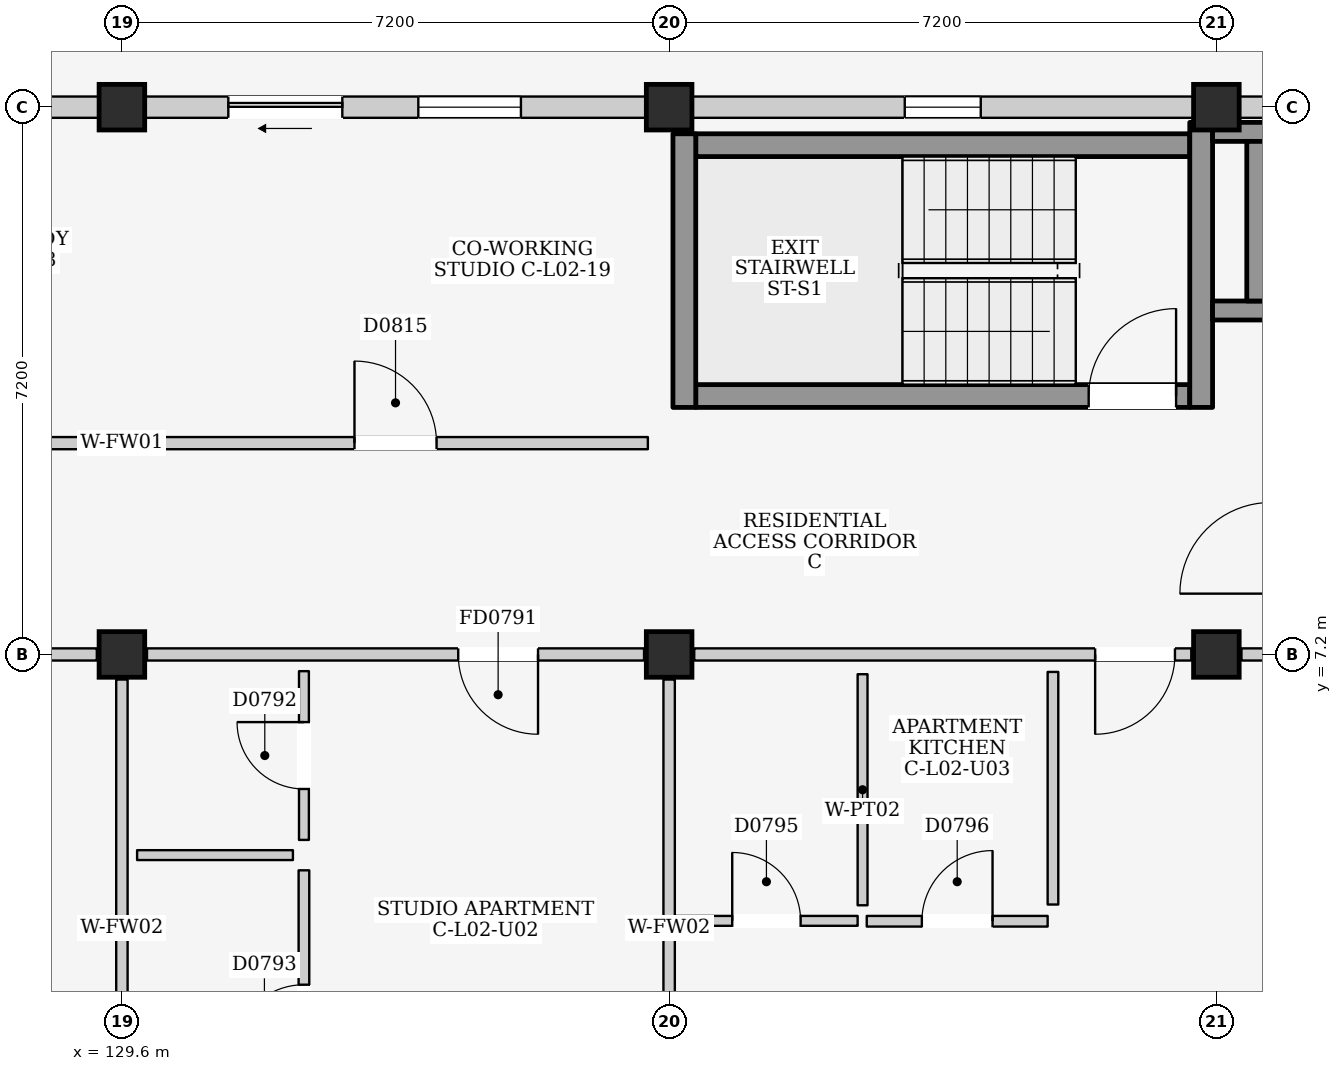
"""IFC4 building model, lengths in metres.
Left out: names, types, materials, properties, quantities, classifications, styles, units other than length and angle.
Written with IfcOpenShell. Run it as: python <this file> out.ifc"""

import sys

from ifc_helpers import new_model, si_unit, direction, frame, frame_2d, origin, origin_2d, place, context, subcontext, project, spatial, rectangle, extrude, element, fill, save


model = new_model("IFC4")
c1 = context("Model", 3, precision=1e-05, world=origin(), true_north=direction((0.0, 1.0)))
c2 = subcontext(c1, "Body", "Model", "MODEL_VIEW")
j1 = project(units=[si_unit("LENGTHUNIT", "METRE"), si_unit("PLANEANGLEUNIT", "RADIAN")], contexts=[c1])
p1 = place(None, origin())
s1 = spatial("IfcSite", under=j1, at=p1, CompositionType="ELEMENT")
p2 = place(p1, origin())
s2 = spatial("IfcBuilding", under=s1, at=p2, CompositionType="ELEMENT")
p3 = place(p2, frame((0.0, 0.0, 9.0)))
s3 = spatial("IfcBuildingStorey", under=s2, at=p3, CompositionType="ELEMENT", Elevation=9.0)
for number, where, z_axis, x_axis in (
    (1, (129.6, 7.2, 0.0), (0.0, 0.0, 1.0), (1.0, 0.0, 0.0)),
    (2, (129.6, 14.4, 0.0), (0.0, 0.0, 1.0), (1.0, 0.0, 0.0)),
    (3, (136.8, 7.2, 0.0), (0.0, 0.0, 1.0), (1.0, 0.0, 0.0)),
    (4, (136.8, 14.4, 0.0), (0.0, 0.0, 1.0), (1.0, 0.0, 0.0)),
    (5, (144.0, 7.2, 0.0), (0.0, 0.0, 1.0), (1.0, 0.0, 0.0)),
    (6, (144.0, 14.4, 0.0), (0.0, 0.0, 1.0), (1.0, 0.0, 0.0)),
):
    element("IfcColumn", number, at=place(p3, frame(where, z_axis=z_axis, x_axis=x_axis)), inside=s3, PredefinedType="COLUMN", context=c2, shape_type="SweptSolid", body=[
        extrude(rectangle(XDim=0.6, YDim=0.6, at=origin_2d()), origin(), (0.0, 0.0, 1.0), 3.2),
    ])
p4 = place(p3, frame((122.7, 14.4, 0.0), z_axis=(0.0, 0.0, 1.0), x_axis=(1.0, 0.0, 0.0)))
e7 = element("IfcWall", 7, at=p4, inside=s3, PredefinedType="ELEMENTEDWALL", context=c2, shape_type="SweptSolid", body=[
    extrude(rectangle(XDim=6.6, YDim=0.28, at=frame_2d((3.3, 0.0))), origin(), (0.0, 0.0, 1.0), 2.345),
])
p5 = place(p4, frame((1.1, 0.0, 0.0)))
e8 = element("IfcOpeningElement", 8, at=p5, cuts=e7, PredefinedType="OPENING", context=c2, shape_type="SweptSolid", body=[
    extrude(rectangle(XDim=1.5, YDim=2.12, at=frame_2d((0.75, 1.06))), frame((0.0, 0.155, 0.0), z_axis=(0.0, -1.0, 0.0), x_axis=(1.0, 0.0, 0.0)), (0.0, 0.0, 1.0), 0.31),
])
p6 = place(p4, frame((3.6, 0.0, 0.735)))
e9 = element("IfcOpeningElement", 9, at=p6, cuts=e7, PredefinedType="OPENING", context=c2, shape_type="SweptSolid", body=[
    extrude(rectangle(XDim=1.35, YDim=1.5, at=frame_2d((0.675, 0.75))), frame((0.0, 0.155, 0.0), z_axis=(0.0, -1.0, 0.0), x_axis=(1.0, 0.0, 0.0)), (0.0, 0.0, 1.0), 0.31),
])
p7 = place(p3, frame((129.9, 14.4, 0.0), z_axis=(0.0, 0.0, 1.0), x_axis=(1.0, 0.0, 0.0)))
e10 = element("IfcWall", 10, at=p7, inside=s3, PredefinedType="ELEMENTEDWALL", context=c2, shape_type="SweptSolid", body=[
    extrude(rectangle(XDim=6.6, YDim=0.28, at=frame_2d((3.3, 0.0))), origin(), (0.0, 0.0, 1.0), 2.345),
])
p8 = place(p7, frame((1.1, 0.0, 0.0)))
e11 = element("IfcOpeningElement", 11, at=p8, cuts=e10, PredefinedType="OPENING", context=c2, shape_type="SweptSolid", body=[
    extrude(rectangle(XDim=1.5, YDim=2.12, at=frame_2d((0.75, 1.06))), frame((0.0, 0.155, 0.0), z_axis=(0.0, -1.0, 0.0), x_axis=(1.0, 0.0, 0.0)), (0.0, 0.0, 1.0), 0.31),
])
p9 = place(p7, frame((3.6, 0.0, 0.735)))
e12 = element("IfcOpeningElement", 12, at=p9, cuts=e10, PredefinedType="OPENING", context=c2, shape_type="SweptSolid", body=[
    extrude(rectangle(XDim=1.35, YDim=1.5, at=frame_2d((0.675, 0.75))), frame((0.0, 0.155, 0.0), z_axis=(0.0, -1.0, 0.0), x_axis=(1.0, 0.0, 0.0)), (0.0, 0.0, 1.0), 0.31),
])
p10 = place(p3, frame((137.1, 14.4, 0.0), z_axis=(0.0, 0.0, 1.0), x_axis=(1.0, 0.0, 0.0)))
e13 = element("IfcWall", 13, at=p10, inside=s3, PredefinedType="ELEMENTEDWALL", context=c2, shape_type="SweptSolid", body=[
    extrude(rectangle(XDim=6.6, YDim=0.28, at=frame_2d((3.3, 0.0))), origin(), (0.0, 0.0, 1.0), 2.345),
])
p11 = place(p10, frame((2.8, 0.0, 1.2)))
e14 = element("IfcOpeningElement", 14, at=p11, cuts=e13, PredefinedType="OPENING", context=c2, shape_type="SweptSolid", body=[
    extrude(rectangle(XDim=1.0, YDim=0.9, at=frame_2d((0.5, 0.45))), frame((0.0, 0.155, 0.0), z_axis=(0.0, -1.0, 0.0), x_axis=(1.0, 0.0, 0.0)), (0.0, 0.0, 1.0), 0.31),
])
p12 = place(p3, frame((144.3, 14.4, 0.0), z_axis=(0.0, 0.0, 1.0), x_axis=(1.0, 0.0, 0.0)))
e15 = element("IfcWall", 15, at=p12, inside=s3, PredefinedType="ELEMENTEDWALL", context=c2, shape_type="SweptSolid", body=[
    extrude(rectangle(XDim=6.6, YDim=0.28, at=frame_2d((3.3, 0.0))), origin(), (0.0, 0.0, 1.0), 2.345),
])
p13 = place(p12, frame((2.8, 0.0, 1.2)))
e16 = element("IfcOpeningElement", 16, at=p13, cuts=e15, PredefinedType="OPENING", context=c2, shape_type="SweptSolid", body=[
    extrude(rectangle(XDim=1.0, YDim=0.9, at=frame_2d((0.5, 0.45))), frame((0.0, 0.155, 0.0), z_axis=(0.0, -1.0, 0.0), x_axis=(1.0, 0.0, 0.0)), (0.0, 0.0, 1.0), 0.31),
])
p14 = place(p3, frame((137.15, 10.6, 0.0), z_axis=(0.0, 0.0, 1.0), x_axis=(1.0, 0.0, 0.0)))
e17 = element("IfcWall", 17, at=p14, inside=s3, PredefinedType="SHEAR", context=c2, shape_type="SweptSolid", body=[
    extrude(rectangle(XDim=6.5, YDim=0.3, at=frame_2d((3.25, 0.0))), origin(), (0.0, 0.0, 1.0), 2.96),
])
p15 = place(p14, frame((5.17, 0.0, 0.0)))
e18 = element("IfcOpeningElement", 18, at=p15, cuts=e17, PredefinedType="OPENING", context=c2, shape_type="SweptSolid", body=[
    extrude(rectangle(XDim=1.15, YDim=2.2, at=frame_2d((0.575, 1.1))), frame((0.0, 0.165, 0.0), z_axis=(0.0, -1.0, 0.0), x_axis=(1.0, 0.0, 0.0)), (0.0, 0.0, 1.0), 0.33),
])
p16 = place(p3, frame((137.15, 13.9, 0.0), z_axis=(0.0, 0.0, 1.0), x_axis=(1.0, 0.0, 0.0)))
e19 = element("IfcWall", 19, at=p16, inside=s3, PredefinedType="SHEAR", context=c2, shape_type="SweptSolid", body=[
    extrude(rectangle(XDim=6.5, YDim=0.3, at=frame_2d((3.25, 0.0))), origin(), (0.0, 0.0, 1.0), 2.96),
])
p17 = place(p3, frame((137.0, 10.45, 0.0), z_axis=(0.0, 0.0, 1.0), x_axis=(0.0, 1.0, 0.0)))
e20 = element("IfcWall", 20, at=p17, inside=s3, PredefinedType="SHEAR", context=c2, shape_type="SweptSolid", body=[
    extrude(rectangle(XDim=3.6, YDim=0.3, at=frame_2d((1.8, 0.0))), origin(), (0.0, 0.0, 1.0), 2.96),
])
p18 = place(p3, frame((143.8, 10.45, 0.0), z_axis=(0.0, 0.0, 1.0), x_axis=(0.0, 1.0, 0.0)))
e21 = element("IfcWall", 21, at=p18, inside=s3, PredefinedType="SHEAR", context=c2, shape_type="SweptSolid", body=[
    extrude(rectangle(XDim=3.75, YDim=0.3, at=frame_2d((1.875, 0.0))), origin(), (0.0, 0.0, 1.0), 2.96),
])
p19 = place(p3, frame((143.95, 11.725, 0.0), z_axis=(0.0, 0.0, 1.0), x_axis=(1.0, 0.0, 0.0)))
e22 = element("IfcWall", 22, at=p19, inside=s3, PredefinedType="SHEAR", context=c2, shape_type="SweptSolid", body=[
    extrude(rectangle(XDim=2.55, YDim=0.25, at=frame_2d((1.275, 0.0))), origin(), (0.0, 0.0, 1.0), 2.96),
])
p20 = place(p19, frame((0.95, 0.0, 0.0)))
e23 = element("IfcOpeningElement", 23, at=p20, cuts=e22, PredefinedType="OPENING", context=c2, shape_type="SweptSolid", body=[
    extrude(rectangle(XDim=1.1, YDim=2.15, at=frame_2d((0.55, 1.075))), frame((0.0, 0.14, 0.0), z_axis=(0.0, -1.0, 0.0), x_axis=(1.0, 0.0, 0.0)), (0.0, 0.0, 1.0), 0.28),
])
p21 = place(p3, frame((143.95, 14.075, 0.0), z_axis=(0.0, 0.0, 1.0), x_axis=(1.0, 0.0, 0.0)))
e24 = element("IfcWall", 24, at=p21, inside=s3, PredefinedType="SHEAR", context=c2, shape_type="SweptSolid", body=[
    extrude(rectangle(XDim=2.55, YDim=0.25, at=frame_2d((1.275, 0.0))), origin(), (0.0, 0.0, 1.0), 2.96),
])
p22 = place(p3, frame((144.525, 11.85, 0.0), z_axis=(0.0, 0.0, 1.0), x_axis=(0.0, 1.0, 0.0)))
e25 = element("IfcWall", 25, at=p22, inside=s3, PredefinedType="SHEAR", context=c2, shape_type="SweptSolid", body=[
    extrude(rectangle(XDim=2.1, YDim=0.25, at=frame_2d((1.05, 0.0))), origin(), (0.0, 0.0, 1.0), 2.96),
])
p23 = place(p3, frame((122.73, 7.2, 0.0), z_axis=(0.0, 0.0, 1.0), x_axis=(1.0, 0.0, 0.0)))
e26 = element("IfcWall", 26, at=p23, inside=s3, PredefinedType="PARTITIONING", context=c2, shape_type="SweptSolid", body=[
    extrude(rectangle(XDim=6.54, YDim=0.16, at=frame_2d((3.27, 0.0))), origin(), (0.0, 0.0, 1.0), 2.345),
])
p24 = place(p23, frame((4.795, 0.0, 0.0)))
e27 = element("IfcOpeningElement", 27, at=p24, cuts=e26, PredefinedType="OPENING", context=c2, shape_type="SweptSolid", body=[
    extrude(rectangle(XDim=1.05, YDim=2.15, at=frame_2d((0.525, 1.075))), frame((0.0, 0.095, 0.0), z_axis=(0.0, -1.0, 0.0), x_axis=(1.0, 0.0, 0.0)), (0.0, 0.0, 1.0), 0.19),
])
p25 = place(p3, frame((129.6, 0.33, 0.0), z_axis=(0.0, 0.0, 1.0), x_axis=(0.0, 1.0, 0.0)))
e28 = element("IfcWall", 28, at=p25, inside=s3, PredefinedType="PARTITIONING", context=c2, shape_type="SweptSolid", body=[
    extrude(rectangle(XDim=6.54, YDim=0.15, at=frame_2d((3.27, 0.0))), origin(), (0.0, 0.0, 1.0), 2.395),
])
p26 = place(p3, frame((129.93, 7.2, 0.0), z_axis=(0.0, 0.0, 1.0), x_axis=(1.0, 0.0, 0.0)))
e29 = element("IfcWall", 29, at=p26, inside=s3, PredefinedType="PARTITIONING", context=c2, shape_type="SweptSolid", body=[
    extrude(rectangle(XDim=6.54, YDim=0.16, at=frame_2d((3.27, 0.0))), origin(), (0.0, 0.0, 1.0), 2.345),
])
p27 = place(p26, frame((4.095, 0.0, 0.0)))
e30 = element("IfcOpeningElement", 30, at=p27, cuts=e29, PredefinedType="OPENING", context=c2, shape_type="SweptSolid", body=[
    extrude(rectangle(XDim=1.05, YDim=2.15, at=frame_2d((0.525, 1.075))), frame((0.0, 0.095, 0.0), z_axis=(0.0, -1.0, 0.0), x_axis=(1.0, 0.0, 0.0)), (0.0, 0.0, 1.0), 0.19),
])
p28 = place(p3, frame((136.8, 0.33, 0.0), z_axis=(0.0, 0.0, 1.0), x_axis=(0.0, 1.0, 0.0)))
e31 = element("IfcWall", 31, at=p28, inside=s3, PredefinedType="PARTITIONING", context=c2, shape_type="SweptSolid", body=[
    extrude(rectangle(XDim=6.54, YDim=0.15, at=frame_2d((3.27, 0.0))), origin(), (0.0, 0.0, 1.0), 2.395),
])
p29 = place(p3, frame((129.8, 4.56, 0.0), z_axis=(0.0, 0.0, 1.0), x_axis=(1.0, 0.0, 0.0)))
e32 = element("IfcWall", 32, at=p29, inside=s3, PredefinedType="PARTITIONING", context=c2, shape_type="SweptSolid", body=[
    extrude(rectangle(XDim=2.05, YDim=0.13, at=frame_2d((1.025, 0.0))), origin(), (0.0, 0.0, 1.0), 2.96),
])
p30 = place(p3, frame((131.995, 4.76, 0.0), z_axis=(0.0, 0.0, 1.0), x_axis=(0.0, 1.0, 0.0)))
e33 = element("IfcWall", 33, at=p30, inside=s3, PredefinedType="PARTITIONING", context=c2, shape_type="SweptSolid", body=[
    extrude(rectangle(XDim=2.22, YDim=0.13, at=frame_2d((1.11, 0.0))), origin(), (0.0, 0.0, 1.0), 2.96),
])
p31 = place(p30, frame((0.67, 0.0, 0.0)))
e34 = element("IfcOpeningElement", 34, at=p31, cuts=e33, PredefinedType="OPENING", context=c2, shape_type="SweptSolid", body=[
    extrude(rectangle(XDim=0.88, YDim=2.1, at=frame_2d((0.44, 1.05))), frame((0.0, 0.08, 0.0), z_axis=(0.0, -1.0, 0.0), x_axis=(1.0, 0.0, 0.0)), (0.0, 0.0, 1.0), 0.16),
])
p32 = place(p3, frame((131.995, 0.42, 0.0), z_axis=(0.0, 0.0, 1.0), x_axis=(0.0, 1.0, 0.0)))
e35 = element("IfcWall", 35, at=p32, inside=s3, PredefinedType="PARTITIONING", context=c2, shape_type="SweptSolid", body=[
    extrude(rectangle(XDim=3.94, YDim=0.14, at=frame_2d((1.97, 0.0))), origin(), (0.0, 0.0, 1.0), 2.96),
])
p33 = place(p32, frame((1.505, 0.0, 0.0)))
e36 = element("IfcOpeningElement", 36, at=p33, cuts=e35, PredefinedType="OPENING", context=c2, shape_type="SweptSolid", body=[
    extrude(rectangle(XDim=0.93, YDim=2.14, at=frame_2d((0.465, 1.07))), frame((0.0, 0.085, 0.0), z_axis=(0.0, -1.0, 0.0), x_axis=(1.0, 0.0, 0.0)), (0.0, 0.0, 1.0), 0.17),
])
p34 = place(p3, frame((137.13, 7.2, 0.0), z_axis=(0.0, 0.0, 1.0), x_axis=(1.0, 0.0, 0.0)))
e37 = element("IfcWall", 37, at=p34, inside=s3, PredefinedType="PARTITIONING", context=c2, shape_type="SweptSolid", body=[
    extrude(rectangle(XDim=6.54, YDim=0.16, at=frame_2d((3.27, 0.0))), origin(), (0.0, 0.0, 1.0), 2.345),
])
p35 = place(p34, frame((5.275, 0.0, 0.0)))
e38 = element("IfcOpeningElement", 38, at=p35, cuts=e37, PredefinedType="OPENING", context=c2, shape_type="SweptSolid", body=[
    extrude(rectangle(XDim=1.05, YDim=2.15, at=frame_2d((0.525, 1.075))), frame((0.0, 0.095, 0.0), z_axis=(0.0, -1.0, 0.0), x_axis=(1.0, 0.0, 0.0)), (0.0, 0.0, 1.0), 0.19),
])
p36 = place(p3, frame((144.33, 7.2, 0.0), z_axis=(0.0, 0.0, 1.0), x_axis=(1.0, 0.0, 0.0)))
e39 = element("IfcWall", 39, at=p36, inside=s3, PredefinedType="PARTITIONING", context=c2, shape_type="SweptSolid", body=[
    extrude(rectangle(XDim=6.54, YDim=0.16, at=frame_2d((3.27, 0.0))), origin(), (0.0, 0.0, 1.0), 2.345),
])
p37 = place(p3, frame((136.88, 3.695, 0.0), z_axis=(0.0, 0.0, 1.0), x_axis=(1.0, 0.0, 0.0)))
e40 = element("IfcWall", 40, at=p37, inside=s3, PredefinedType="PARTITIONING", context=c2, shape_type="SweptSolid", body=[
    extrude(rectangle(XDim=2.4, YDim=0.13, at=frame_2d((1.2, 0.0))), origin(), (0.0, 0.0, 1.0), 2.96),
])
p38 = place(p37, frame((0.75, 0.0, 0.0)))
e41 = element("IfcOpeningElement", 41, at=p38, cuts=e40, PredefinedType="OPENING", context=c2, shape_type="SweptSolid", body=[
    extrude(rectangle(XDim=0.9, YDim=2.1, at=frame_2d((0.45, 1.05))), frame((0.0, 0.08, 0.0), z_axis=(0.0, -1.0, 0.0), x_axis=(1.0, 0.0, 0.0)), (0.0, 0.0, 1.0), 0.16),
])
p39 = place(p3, frame((139.345, 3.9, 0.0), z_axis=(0.0, 0.0, 1.0), x_axis=(0.0, 1.0, 0.0)))
e42 = element("IfcWall", 42, at=p39, inside=s3, PredefinedType="PARTITIONING", context=c2, shape_type="SweptSolid", body=[
    extrude(rectangle(XDim=3.04, YDim=0.13, at=frame_2d((1.52, 0.0))), origin(), (0.0, 0.0, 1.0), 2.96),
])
p40 = place(p3, frame((139.4, 3.69, 0.0), z_axis=(0.0, 0.0, 1.0), x_axis=(1.0, 0.0, 0.0)))
e43 = element("IfcWall", 43, at=p40, inside=s3, PredefinedType="PARTITIONING", context=c2, shape_type="SweptSolid", body=[
    extrude(rectangle(XDim=2.38, YDim=0.14, at=frame_2d((1.19, 0.0))), origin(), (0.0, 0.0, 1.0), 2.96),
])
p41 = place(p40, frame((0.725, 0.0, 0.0)))
e44 = element("IfcOpeningElement", 44, at=p41, cuts=e43, PredefinedType="OPENING", context=c2, shape_type="SweptSolid", body=[
    extrude(rectangle(XDim=0.93, YDim=2.14, at=frame_2d((0.465, 1.07))), frame((0.0, 0.085, 0.0), z_axis=(0.0, -1.0, 0.0), x_axis=(1.0, 0.0, 0.0)), (0.0, 0.0, 1.0), 0.17),
])
p42 = place(p3, frame((141.85, 3.91, 0.0), z_axis=(0.0, 0.0, 1.0), x_axis=(0.0, 1.0, 0.0)))
e45 = element("IfcWall", 45, at=p42, inside=s3, PredefinedType="PARTITIONING", context=c2, shape_type="SweptSolid", body=[
    extrude(rectangle(XDim=3.06, YDim=0.14, at=frame_2d((1.53, 0.0))), origin(), (0.0, 0.0, 1.0), 2.96),
])
p43 = place(p3, frame((122.68, 9.98, 0.0), z_axis=(0.0, 0.0, 1.0), x_axis=(1.0, 0.0, 0.0)))
e46 = element("IfcWall", 46, at=p43, inside=s3, PredefinedType="PARTITIONING", context=c2, shape_type="SweptSolid", body=[
    extrude(rectangle(XDim=6.64, YDim=0.16, at=frame_2d((3.32, 0.0))), origin(), (0.0, 0.0, 1.0), 2.96),
])
p44 = place(p43, frame((2.78, 0.0, 0.0)))
e47 = element("IfcOpeningElement", 47, at=p44, cuts=e46, PredefinedType="OPENING", context=c2, shape_type="SweptSolid", body=[
    extrude(rectangle(XDim=1.08, YDim=2.22, at=frame_2d((0.54, 1.11))), frame((0.0, 0.095, 0.0), z_axis=(0.0, -1.0, 0.0), x_axis=(1.0, 0.0, 0.0)), (0.0, 0.0, 1.0), 0.19),
])
p45 = place(p3, frame((129.88, 9.98, 0.0), z_axis=(0.0, 0.0, 1.0), x_axis=(1.0, 0.0, 0.0)))
e48 = element("IfcWall", 48, at=p45, inside=s3, PredefinedType="PARTITIONING", context=c2, shape_type="SweptSolid", body=[
    extrude(rectangle(XDim=6.64, YDim=0.16, at=frame_2d((3.32, 0.0))), origin(), (0.0, 0.0, 1.0), 2.96),
])
p46 = place(p45, frame((2.78, 0.0, 0.0)))
e49 = element("IfcOpeningElement", 49, at=p46, cuts=e48, PredefinedType="OPENING", context=c2, shape_type="SweptSolid", body=[
    extrude(rectangle(XDim=1.08, YDim=2.22, at=frame_2d((0.54, 1.11))), frame((0.0, 0.095, 0.0), z_axis=(0.0, -1.0, 0.0), x_axis=(1.0, 0.0, 0.0)), (0.0, 0.0, 1.0), 0.19),
])
p47 = place(p8, frame((1.5, 0.0, 0.0), z_axis=(0.0, 0.0, 1.0), x_axis=(-1.0, 0.0, 0.0)))
e50 = element("IfcDoor", 50, at=p47, inside=s3, OperationType="SLIDING_TO_LEFT", PredefinedType="DOOR", context=c2, shape_type="SweptSolid", body=[
    extrude(rectangle(XDim=1.5, YDim=2.12, at=frame_2d((0.75, 1.06))), frame((0.0, 0.025, 0.0), z_axis=(0.0, -1.0, 0.0), x_axis=(1.0, 0.0, 0.0)), (0.0, 0.0, 1.0), 0.05),
])
fill(e11, e50)
p48 = place(p9, origin())
e51 = element("IfcWindow", 51, at=p48, inside=s3, PartitioningType="SINGLE_PANEL", PredefinedType="WINDOW", context=c2, shape_type="SweptSolid", body=[
    extrude(rectangle(XDim=1.35, YDim=1.5, at=frame_2d((0.675, 0.75))), frame((0.0, 0.03, 0.0), z_axis=(0.0, -1.0, 0.0), x_axis=(1.0, 0.0, 0.0)), (0.0, 0.0, 1.0), 0.06),
])
fill(e12, e51)
p49 = place(p11, origin())
e52 = element("IfcWindow", 52, at=p49, inside=s3, PartitioningType="SINGLE_PANEL", PredefinedType="WINDOW", context=c2, shape_type="SweptSolid", body=[
    extrude(rectangle(XDim=1.0, YDim=0.9, at=frame_2d((0.5, 0.45))), frame((0.0, 0.03, 0.0), z_axis=(0.0, -1.0, 0.0), x_axis=(1.0, 0.0, 0.0)), (0.0, 0.0, 1.0), 0.06),
])
fill(e14, e52)
p50 = place(p15, origin())
e53 = element("IfcDoor", 53, at=p50, inside=s3, OperationType="SINGLE_SWING_RIGHT", PredefinedType="DOOR", context=c2, shape_type="SweptSolid", body=[
    extrude(rectangle(XDim=1.15, YDim=2.2, at=frame_2d((0.575, 1.1))), frame((0.0, 0.025, 0.0), z_axis=(0.0, -1.0, 0.0), x_axis=(1.0, 0.0, 0.0)), (0.0, 0.0, 1.0), 0.05),
])
fill(e18, e53)
p51 = place(p27, frame((1.05, 0.0, 0.0), z_axis=(0.0, 0.0, 1.0), x_axis=(-1.0, 0.0, 0.0)))
e54 = element("IfcDoor", 54, at=p51, inside=s3, OperationType="SINGLE_SWING_LEFT", PredefinedType="DOOR", context=c2, shape_type="SweptSolid", body=[
    extrude(rectangle(XDim=1.05, YDim=2.15, at=frame_2d((0.525, 1.075))), frame((0.0, 0.025, 0.0), z_axis=(0.0, -1.0, 0.0), x_axis=(1.0, 0.0, 0.0)), (0.0, 0.0, 1.0), 0.05),
])
fill(e30, e54)
p52 = place(p31, origin())
e55 = element("IfcDoor", 55, at=p52, inside=s3, OperationType="SINGLE_SWING_RIGHT", PredefinedType="DOOR", context=c2, shape_type="SweptSolid", body=[
    extrude(rectangle(XDim=0.88, YDim=2.1, at=frame_2d((0.44, 1.05))), frame((0.0, 0.025, 0.0), z_axis=(0.0, -1.0, 0.0), x_axis=(1.0, 0.0, 0.0)), (0.0, 0.0, 1.0), 0.05),
])
fill(e34, e55)
p53 = place(p33, origin())
e56 = element("IfcDoor", 56, at=p53, inside=s3, OperationType="SINGLE_SWING_LEFT", PredefinedType="DOOR", context=c2, shape_type="SweptSolid", body=[
    extrude(rectangle(XDim=0.93, YDim=2.14, at=frame_2d((0.465, 1.07))), frame((0.0, 0.025, 0.0), z_axis=(0.0, -1.0, 0.0), x_axis=(1.0, 0.0, 0.0)), (0.0, 0.0, 1.0), 0.05),
])
fill(e36, e56)
p54 = place(p35, frame((1.05, 0.0, 0.0), z_axis=(0.0, 0.0, 1.0), x_axis=(-1.0, 0.0, 0.0)))
e57 = element("IfcDoor", 57, at=p54, inside=s3, OperationType="SINGLE_SWING_RIGHT", PredefinedType="DOOR", context=c2, shape_type="SweptSolid", body=[
    extrude(rectangle(XDim=1.05, YDim=2.15, at=frame_2d((0.525, 1.075))), frame((0.0, 0.025, 0.0), z_axis=(0.0, -1.0, 0.0), x_axis=(1.0, 0.0, 0.0)), (0.0, 0.0, 1.0), 0.05),
])
fill(e38, e57)
p55 = place(p38, origin())
e58 = element("IfcDoor", 58, at=p55, inside=s3, OperationType="SINGLE_SWING_LEFT", PredefinedType="DOOR", context=c2, shape_type="SweptSolid", body=[
    extrude(rectangle(XDim=0.9, YDim=2.1, at=frame_2d((0.45, 1.05))), frame((0.0, 0.025, 0.0), z_axis=(0.0, -1.0, 0.0), x_axis=(1.0, 0.0, 0.0)), (0.0, 0.0, 1.0), 0.05),
])
fill(e41, e58)
p56 = place(p41, origin())
e59 = element("IfcDoor", 59, at=p56, inside=s3, OperationType="SINGLE_SWING_RIGHT", PredefinedType="DOOR", context=c2, shape_type="SweptSolid", body=[
    extrude(rectangle(XDim=0.93, YDim=2.14, at=frame_2d((0.465, 1.07))), frame((0.0, 0.025, 0.0), z_axis=(0.0, -1.0, 0.0), x_axis=(1.0, 0.0, 0.0)), (0.0, 0.0, 1.0), 0.05),
])
fill(e44, e59)
p57 = place(p46, origin())
e60 = element("IfcDoor", 60, at=p57, inside=s3, OperationType="SINGLE_SWING_LEFT", PredefinedType="DOOR", context=c2, shape_type="SweptSolid", body=[
    extrude(rectangle(XDim=1.08, YDim=2.22, at=frame_2d((0.54, 1.11))), frame((0.0, 0.025, 0.0), z_axis=(0.0, -1.0, 0.0), x_axis=(1.0, 0.0, 0.0)), (0.0, 0.0, 1.0), 0.05),
])
fill(e49, e60)
save(model, sys.argv[1])
